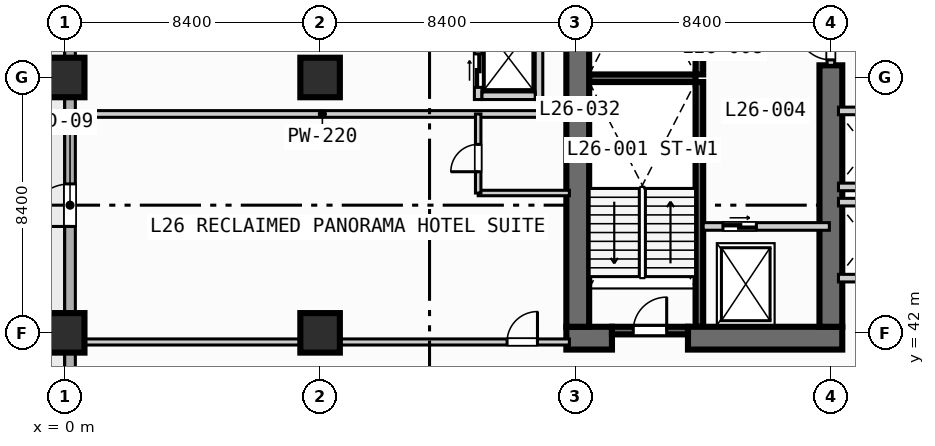
"""IFC4 building model, lengths in metres.
Left out: names, types, materials, properties, quantities, classifications, styles, units other than length and angle.
Written with IfcOpenShell. Run it as: python <this file> out.ifc"""

import sys

from ifc_helpers import new_model, si_unit, direction, frame, frame_2d, origin, origin_2d, place, context, subcontext, project, spatial, rectangle, extrude, element, fill, save


model = new_model("IFC4")
c1 = context("Model", 3, precision=1e-05, world=origin(), true_north=direction((0.0, 1.0)))
c2 = subcontext(c1, "Body", "Model", "MODEL_VIEW")
j1 = project(units=[si_unit("LENGTHUNIT", "METRE"), si_unit("PLANEANGLEUNIT", "RADIAN")], contexts=[c1])
p1 = place(None, origin())
s1 = spatial("IfcSite", under=j1, at=p1, CompositionType="ELEMENT")
p2 = place(p1, origin())
s2 = spatial("IfcBuilding", under=s1, at=p2, CompositionType="ELEMENT")
p3 = place(p2, frame((0.0, 0.0, 111.4)))
s3 = spatial("IfcBuildingStorey", under=s2, at=p3, CompositionType="ELEMENT", Elevation=111.4)
for number, where, z_axis, x_axis in (
    (1, (20.875, 42.2, 0.0), (0.0, 0.0, 1.0), (0.0, 1.0, 0.0)),
    (2, (20.875, 50.5, 0.0), (0.0, 0.0, 1.0), (0.0, 1.0, 0.0)),
):
    element("IfcWall", number, at=place(p3, frame(where, z_axis=z_axis, x_axis=x_axis)), inside=s3, PredefinedType="SOLIDWALL", context=c2, shape_type="SweptSolid", body=[
        extrude(rectangle(XDim=8.05, YDim=0.25, at=frame_2d((4.025, 0.0))), origin(), (0.0, 0.0, 1.0), 3.55),
    ])
p4 = place(p3, frame((17.25, 50.375, 0.0), z_axis=(0.0, 0.0, 1.0), x_axis=(1.0, 0.0, 0.0)))
e3 = element("IfcWall", 3, at=p4, inside=s3, PredefinedType="SOLIDWALL", context=c2, shape_type="SweptSolid", body=[
    extrude(rectangle(XDim=3.5, YDim=0.25, at=frame_2d((1.75, 0.0))), origin(), (0.0, 0.0, 1.0), 3.55),
])
p5 = place(p3, frame((16.5, 41.825, 0.0), z_axis=(0.0, 0.0, 1.0), x_axis=(1.0, 0.0, 0.0)))
e4 = element("IfcWall", 4, at=p5, inside=s3, PredefinedType="SHEAR", context=c2, shape_type="SweptSolid", body=[
    extrude(rectangle(XDim=1.5, YDim=0.75, at=frame_2d((0.75, 0.0))), origin(), (0.0, 0.0, 1.0), 3.55),
])
p6 = place(p3, frame((20.5, 41.825, 0.0), z_axis=(0.0, 0.0, 1.0), x_axis=(1.0, 0.0, 0.0)))
e5 = element("IfcWall", 5, at=p6, inside=s3, PredefinedType="SHEAR", context=c2, shape_type="SweptSolid", body=[
    extrude(rectangle(XDim=5.075, YDim=0.75, at=frame_2d((2.538, 0.0))), origin(), (0.0, 0.0, 1.0), 3.55),
])
p7 = place(p3, frame((16.875, 42.2, 0.0), z_axis=(0.0, 0.0, 1.0), x_axis=(0.0, 1.0, 0.0)))
e6 = element("IfcWall", 6, at=p7, inside=s3, PredefinedType="SHEAR", context=c2, shape_type="SweptSolid", body=[
    extrude(rectangle(XDim=16.35, YDim=0.75, at=frame_2d((8.175, 0.0))), origin(), (0.0, 0.0, 1.0), 3.55),
])
p8 = place(p3, frame((25.2, 42.2, 0.0), z_axis=(0.0, 0.0, 1.0), x_axis=(0.0, 1.0, 0.0)))
e7 = element("IfcWall", 7, at=p8, inside=s3, PredefinedType="SHEAR", context=c2, shape_type="SweptSolid", body=[
    extrude(rectangle(XDim=8.6, YDim=0.75, at=frame_2d((4.3, 0.0))), origin(), (0.0, 0.0, 1.0), 3.55),
])
for number, where, z_axis, x_axis in (
    (8, (0.0, 42.0, 0.0), (0.0, 0.0, 1.0), (1.0, 0.0, 0.0)),
    (9, (0.0, 50.4, 0.0), (0.0, 0.0, 1.0), (1.0, 0.0, 0.0)),
    (10, (8.4, 42.0, 0.0), (0.0, 0.0, 1.0), (1.0, 0.0, 0.0)),
    (11, (8.4, 50.4, 0.0), (0.0, 0.0, 1.0), (1.0, 0.0, 0.0)),
):
    element("IfcColumn", number, at=place(p3, frame(where, z_axis=z_axis, x_axis=x_axis)), inside=s3, PredefinedType="COLUMN", context=c2, shape_type="SweptSolid", body=[
        extrude(rectangle(XDim=1.3, YDim=1.3, at=origin_2d()), origin(), (0.0, 0.0, 1.0), 3.8),
    ])
p9 = place(p3, frame((0.175, 3.175, 0.0), z_axis=(0.0, 0.0, 1.0), x_axis=(0.0, 1.0, 0.0)))
e12 = element("IfcWall", 12, at=p9, inside=s3, PredefinedType="STANDARD", context=c2, shape_type="SweptSolid", body=[
    extrude(rectangle(XDim=86.05, YDim=0.35, at=frame_2d((43.025, 0.0))), origin(), (0.0, 0.0, 1.0), 3.55),
])
p10 = place(p9, frame((42.325, 0.0, 0.0)))
e13 = element("IfcOpeningElement", 13, at=p10, cuts=e12, PredefinedType="OPENING", context=c2, shape_type="SweptSolid", body=[
    extrude(rectangle(XDim=1.4, YDim=2.2, at=frame_2d((0.7, 1.1))), frame((0.0, 0.185, 0.0), z_axis=(0.0, -1.0, 0.0), x_axis=(1.0, 0.0, 0.0)), (0.0, 0.0, 1.0), 0.37),
])
p11 = place(p9, frame((33.525, 0.0, 0.85)))
e14 = element("IfcOpeningElement", 14, at=p11, cuts=e12, PredefinedType="OPENING", context=c2, shape_type="SweptSolid", body=[
    extrude(rectangle(XDim=2.2, YDim=1.8, at=frame_2d((1.1, 0.9))), frame((0.0, 0.185, 0.0), z_axis=(0.0, -1.0, 0.0), x_axis=(1.0, 0.0, 0.0)), (0.0, 0.0, 1.0), 0.37),
])
p12 = place(p9, frame((22.775, 0.0, 0.85)))
e15 = element("IfcOpeningElement", 15, at=p12, cuts=e12, PredefinedType="OPENING", context=c2, shape_type="SweptSolid", body=[
    extrude(rectangle(XDim=1.8, YDim=1.8, at=frame_2d((0.9, 0.9))), frame((0.0, 0.185, 0.0), z_axis=(0.0, -1.0, 0.0), x_axis=(1.0, 0.0, 0.0)), (0.0, 0.0, 1.0), 0.37),
])
p13 = place(p9, frame((27.625, 0.0, 0.85)))
e16 = element("IfcOpeningElement", 16, at=p13, cuts=e12, PredefinedType="OPENING", context=c2, shape_type="SweptSolid", body=[
    extrude(rectangle(XDim=1.8, YDim=1.8, at=frame_2d((0.9, 0.9))), frame((0.0, 0.185, 0.0), z_axis=(0.0, -1.0, 0.0), x_axis=(1.0, 0.0, 0.0)), (0.0, 0.0, 1.0), 0.37),
])
p14 = place(p3, frame((18.0, 42.075, 0.0), z_axis=(0.0, 0.0, 1.0), x_axis=(1.0, 0.0, 0.0)))
e17 = element("IfcWall", 17, at=p14, inside=s3, PredefinedType="SOLIDWALL", context=c2, shape_type="SweptSolid", body=[
    extrude(rectangle(XDim=2.5, YDim=0.25, at=frame_2d((1.25, 0.0))), origin(), (0.0, 0.0, 1.0), 3.55),
])
p15 = place(p14, frame((0.7, 0.0, 0.0)))
e18 = element("IfcOpeningElement", 18, at=p15, cuts=e17, PredefinedType="OPENING", context=c2, shape_type="SweptSolid", body=[
    extrude(rectangle(XDim=1.1, YDim=2.15, at=frame_2d((0.55, 1.075))), frame((0.0, 0.135, 0.0), z_axis=(0.0, -1.0, 0.0), x_axis=(1.0, 0.0, 0.0)), (0.0, 0.0, 1.0), 0.27),
])
p16 = place(p3, frame((21.0, 45.5, 0.0), z_axis=(0.0, 0.0, 1.0), x_axis=(1.0, 0.0, 0.0)))
e19 = element("IfcWall", 19, at=p16, inside=s3, PredefinedType="SOLIDWALL", context=c2, shape_type="SweptSolid", body=[
    extrude(rectangle(XDim=4.15, YDim=0.25, at=frame_2d((2.075, 0.0))), origin(), (0.0, 0.0, 1.0), 3.55),
])
p17 = place(p16, frame((0.65, 0.0, 0.0)))
e20 = element("IfcOpeningElement", 20, at=p17, cuts=e19, PredefinedType="OPENING", context=c2, shape_type="SweptSolid", body=[
    extrude(rectangle(XDim=1.1, YDim=2.15, at=frame_2d((0.55, 1.075))), frame((0.0, 0.135, 0.0), z_axis=(0.0, -1.0, 0.0), x_axis=(1.0, 0.0, 0.0)), (0.0, 0.0, 1.0), 0.27),
])
p18 = place(p3, frame((25.2, 50.8, 0.0), z_axis=(0.0, 0.0, 1.0), x_axis=(0.0, 1.0, 0.0)))
e21 = element("IfcWall", 21, at=p18, inside=s3, PredefinedType="SOLIDWALL", context=c2, shape_type="SweptSolid", body=[
    extrude(rectangle(XDim=1.48, YDim=0.25, at=frame_2d((0.74, 0.0))), origin(), (0.0, 0.0, 1.0), 3.55),
])
p19 = place(p18, frame((0.18, 0.0, 0.0)))
e22 = element("IfcOpeningElement", 22, at=p19, cuts=e21, PredefinedType="OPENING", context=c2, shape_type="SweptSolid", body=[
    extrude(rectangle(XDim=1.1, YDim=2.15, at=frame_2d((0.55, 1.075))), frame((0.0, 0.135, 0.0), z_axis=(0.0, -1.0, 0.0), x_axis=(1.0, 0.0, 0.0)), (0.0, 0.0, 1.0), 0.27),
])
p20 = place(p3, frame((13.6, 49.675, 0.0), z_axis=(0.0, 0.0, 1.0), x_axis=(0.0, 1.0, 0.0)))
e23 = element("IfcWall", 23, at=p20, inside=s3, PredefinedType="SOLIDWALL", context=c2, shape_type="SweptSolid", body=[
    extrude(rectangle(XDim=2.75, YDim=0.25, at=frame_2d((1.375, 0.0))), origin(), (0.0, 0.0, 1.0), 3.55),
])
p21 = place(p20, frame((0.4, 0.0, 0.0)))
e24 = element("IfcOpeningElement", 24, at=p21, cuts=e23, PredefinedType="OPENING", context=c2, shape_type="SweptSolid", body=[
    extrude(rectangle(XDim=1.1, YDim=2.15, at=frame_2d((0.55, 1.075))), frame((0.0, 0.135, 0.0), z_axis=(0.0, -1.0, 0.0), x_axis=(1.0, 0.0, 0.0)), (0.0, 0.0, 1.0), 0.27),
])
p22 = place(p3, frame((15.6, 49.675, 0.0), z_axis=(0.0, 0.0, 1.0), x_axis=(0.0, 1.0, 0.0)))
e25 = element("IfcWall", 25, at=p22, inside=s3, PredefinedType="SOLIDWALL", context=c2, shape_type="SweptSolid", body=[
    extrude(rectangle(XDim=2.75, YDim=0.25, at=frame_2d((1.375, 0.0))), origin(), (0.0, 0.0, 1.0), 3.55),
])
p23 = place(p3, frame((13.725, 49.8, 0.0), z_axis=(0.0, 0.0, 1.0), x_axis=(1.0, 0.0, 0.0)))
e26 = element("IfcWall", 26, at=p23, inside=s3, PredefinedType="SOLIDWALL", context=c2, shape_type="SweptSolid", body=[
    extrude(rectangle(XDim=1.75, YDim=0.25, at=frame_2d((0.875, 0.0))), origin(), (0.0, 0.0, 1.0), 3.55),
])
for number, where, z_axis, x_axis in (
    (27, (25.45, 43.8, 0.0), (0.0, 0.0, 1.0), (1.0, 0.0, 0.0)),
    (28, (25.45, 46.3, 0.0), (0.0, 0.0, 1.0), (1.0, 0.0, 0.0)),
    (29, (25.45, 46.8, 0.0), (0.0, 0.0, 1.0), (1.0, 0.0, 0.0)),
    (30, (25.45, 49.3, 0.0), (0.0, 0.0, 1.0), (1.0, 0.0, 0.0)),
):
    element("IfcWall", number, at=place(p3, frame(where, z_axis=z_axis, x_axis=x_axis)), inside=s3, PredefinedType="SOLIDWALL", context=c2, shape_type="SweptSolid", body=[
        extrude(rectangle(XDim=1.825, YDim=0.25, at=frame_2d((0.913, 0.0))), origin(), (0.0, 0.0, 1.0), 3.55),
    ])
p24 = place(p3, frame((0.35, 41.7, 0.0), z_axis=(0.0, 0.0, 1.0), x_axis=(1.0, 0.0, 0.0)))
e31 = element("IfcWall", 31, at=p24, inside=s3, PredefinedType="PARTITIONING", context=c2, shape_type="SweptSolid", body=[
    extrude(rectangle(XDim=16.25, YDim=0.2, at=frame_2d((8.125, 0.0))), origin(), (0.0, 0.0, 1.0), 2.8),
])
p25 = place(p24, frame((14.2, 0.0, 0.0)))
e32 = element("IfcOpeningElement", 32, at=p25, cuts=e31, PredefinedType="OPENING", context=c2, shape_type="SweptSolid", body=[
    extrude(rectangle(XDim=1.0, YDim=2.15, at=frame_2d((0.5, 1.075))), frame((0.0, 0.11, 0.0), z_axis=(0.0, -1.0, 0.0), x_axis=(1.0, 0.0, 0.0)), (0.0, 0.0, 1.0), 0.22),
])
p26 = place(p3, frame((0.35, 49.2, 0.0), z_axis=(0.0, 0.0, 1.0), x_axis=(1.0, 0.0, 0.0)))
e33 = element("IfcWall", 33, at=p26, inside=s3, PredefinedType="PARTITIONING", context=c2, shape_type="SweptSolid", body=[
    extrude(rectangle(XDim=16.25, YDim=0.22, at=frame_2d((8.125, 0.0))), origin(), (0.0, 0.0, 1.0), 3.55),
])
p27 = place(p3, frame((13.6, 46.6, 0.0), z_axis=(0.0, 0.0, 1.0), x_axis=(1.0, 0.0, 0.0)))
e34 = element("IfcWall", 34, at=p27, inside=s3, PredefinedType="PLUMBINGWALL", context=c2, shape_type="SweptSolid", body=[
    extrude(rectangle(XDim=3.0, YDim=0.18, at=frame_2d((1.5, 0.0))), origin(), (0.0, 0.0, 1.0), 3.55),
])
p28 = place(p3, frame((13.6, 46.6, 0.0), z_axis=(0.0, 0.0, 1.0), x_axis=(0.0, 1.0, 0.0)))
e35 = element("IfcWall", 35, at=p28, inside=s3, PredefinedType="PLUMBINGWALL", context=c2, shape_type="SweptSolid", body=[
    extrude(rectangle(XDim=2.6, YDim=0.18, at=frame_2d((1.3, 0.0))), origin(), (0.0, 0.0, 1.0), 3.55),
])
p29 = place(p28, frame((0.7, 0.0, 0.0)))
e36 = element("IfcOpeningElement", 36, at=p29, cuts=e35, PredefinedType="OPENING", context=c2, shape_type="SweptSolid", body=[
    extrude(rectangle(XDim=0.9, YDim=2.1, at=frame_2d((0.45, 1.05))), frame((0.0, 0.1, 0.0), z_axis=(0.0, -1.0, 0.0), x_axis=(1.0, 0.0, 0.0)), (0.0, 0.0, 1.0), 0.2),
])
p30 = place(p10, origin())
e37 = element("IfcDoor", 37, at=p30, inside=s3, OperationType="SINGLE_SWING_LEFT", PredefinedType="DOOR", context=c2, shape_type="SweptSolid", body=[
    extrude(rectangle(XDim=1.4, YDim=2.2, at=frame_2d((0.7, 1.1))), frame((0.0, 0.025, 0.0), z_axis=(0.0, -1.0, 0.0), x_axis=(1.0, 0.0, 0.0)), (0.0, 0.0, 1.0), 0.05),
])
fill(e13, e37)
p31 = place(p15, origin())
e38 = element("IfcDoor", 38, at=p31, inside=s3, OperationType="SINGLE_SWING_RIGHT", PredefinedType="DOOR", context=c2, shape_type="SweptSolid", body=[
    extrude(rectangle(XDim=1.1, YDim=2.15, at=frame_2d((0.55, 1.075))), frame((0.0, 0.025, 0.0), z_axis=(0.0, -1.0, 0.0), x_axis=(1.0, 0.0, 0.0)), (0.0, 0.0, 1.0), 0.05),
])
fill(e18, e38)
p32 = place(p17, origin())
e39 = element("IfcDoor", 39, at=p32, inside=s3, OperationType="SLIDING_TO_LEFT", PredefinedType="DOOR", context=c2, shape_type="SweptSolid", body=[
    extrude(rectangle(XDim=1.1, YDim=2.15, at=frame_2d((0.55, 1.075))), frame((0.0, 0.025, 0.0), z_axis=(0.0, -1.0, 0.0), x_axis=(1.0, 0.0, 0.0)), (0.0, 0.0, 1.0), 0.05),
])
fill(e20, e39)
p33 = place(p19, origin())
e40 = element("IfcDoor", 40, at=p33, inside=s3, OperationType="SINGLE_SWING_RIGHT", PredefinedType="DOOR", context=c2, shape_type="SweptSolid", body=[
    extrude(rectangle(XDim=1.1, YDim=2.15, at=frame_2d((0.55, 1.075))), frame((0.0, 0.025, 0.0), z_axis=(0.0, -1.0, 0.0), x_axis=(1.0, 0.0, 0.0)), (0.0, 0.0, 1.0), 0.05),
])
fill(e22, e40)
p34 = place(p21, origin())
e41 = element("IfcDoor", 41, at=p34, inside=s3, OperationType="SLIDING_TO_LEFT", PredefinedType="DOOR", context=c2, shape_type="SweptSolid", body=[
    extrude(rectangle(XDim=1.1, YDim=2.15, at=frame_2d((0.55, 1.075))), frame((0.0, 0.025, 0.0), z_axis=(0.0, -1.0, 0.0), x_axis=(1.0, 0.0, 0.0)), (0.0, 0.0, 1.0), 0.05),
])
fill(e24, e41)
p35 = place(p25, origin())
e42 = element("IfcDoor", 42, at=p35, inside=s3, OperationType="SINGLE_SWING_RIGHT", PredefinedType="DOOR", context=c2, shape_type="SweptSolid", body=[
    extrude(rectangle(XDim=1.0, YDim=2.15, at=frame_2d((0.5, 1.075))), frame((0.0, 0.025, 0.0), z_axis=(0.0, -1.0, 0.0), x_axis=(1.0, 0.0, 0.0)), (0.0, 0.0, 1.0), 0.05),
])
fill(e32, e42)
p36 = place(p29, origin())
e43 = element("IfcDoor", 43, at=p36, inside=s3, OperationType="SINGLE_SWING_LEFT", PredefinedType="DOOR", context=c2, shape_type="SweptSolid", body=[
    extrude(rectangle(XDim=0.9, YDim=2.1, at=frame_2d((0.45, 1.05))), frame((0.0, 0.025, 0.0), z_axis=(0.0, -1.0, 0.0), x_axis=(1.0, 0.0, 0.0)), (0.0, 0.0, 1.0), 0.05),
])
fill(e36, e43)
save(model, sys.argv[1])
